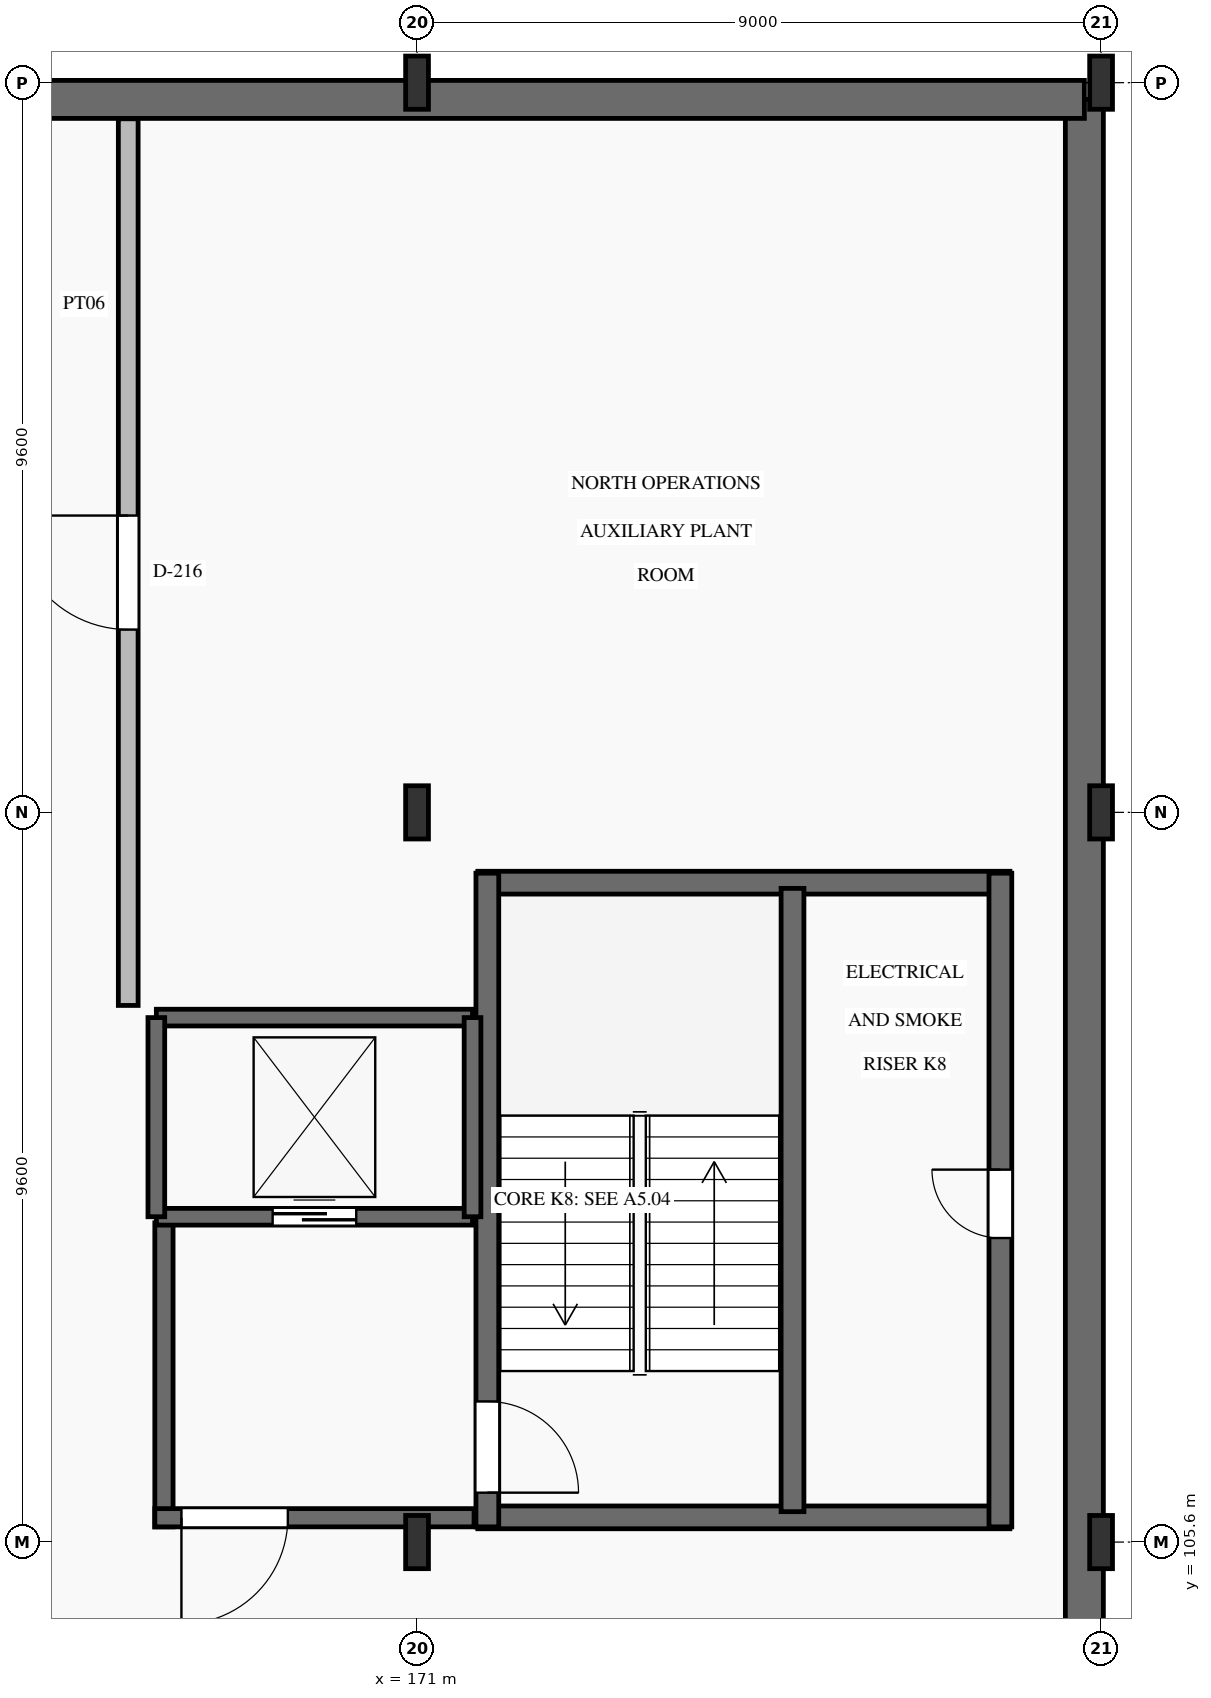
"""IFC4 building model, lengths in metres.
Left out: names, types, materials, properties, quantities, classifications, styles, units other than length and angle.
Written with IfcOpenShell. Run it as: python <this file> out.ifc"""

import sys

from ifc_helpers import new_model, si_unit, direction, frame, frame_2d, origin, origin_2d, place, context, subcontext, project, spatial, rectangle, i_section, extrude, element, fill, save


model = new_model("IFC4")
c1 = context("Model", 3, precision=1e-05, world=origin(), true_north=direction((0.0, 1.0)))
c2 = subcontext(c1, "Body", "Model", "MODEL_VIEW")
j1 = project(units=[si_unit("LENGTHUNIT", "METRE"), si_unit("PLANEANGLEUNIT", "RADIAN")], contexts=[c1])
p1 = place(None, origin())
s1 = spatial("IfcSite", under=j1, at=p1, CompositionType="ELEMENT")
p2 = place(p1, origin())
s2 = spatial("IfcBuilding", under=s1, at=p2, CompositionType="ELEMENT")
p3 = place(p2, frame((0.0, 0.0, -4.5)))
s3 = spatial("IfcBuildingStorey", under=s2, at=p3, CompositionType="ELEMENT", Elevation=-4.5)
for number, where, z_axis, x_axis in (
    (1, (171.0, 105.6, 0.0), (0.0, 0.0, 1.0), (1.0, 0.0, 0.0)),
    (2, (171.0, 115.2, 0.0), (0.0, 0.0, 1.0), (1.0, 0.0, 0.0)),
    (3, (171.0, 124.8, 0.0), (0.0, 0.0, 1.0), (1.0, 0.0, 0.0)),
    (4, (180.0, 105.6, 0.0), (0.0, 0.0, 1.0), (1.0, 0.0, 0.0)),
    (5, (180.0, 115.2, 0.0), (0.0, 0.0, 1.0), (1.0, 0.0, 0.0)),
    (6, (180.0, 124.8, 0.0), (0.0, 0.0, 1.0), (1.0, 0.0, 0.0)),
):
    element("IfcColumn", number, at=place(p3, frame(where, z_axis=z_axis, x_axis=x_axis)), inside=s3, PredefinedType="COLUMN", context=c2, shape_type="SweptSolid", body=[
        extrude(i_section(OverallWidth=0.3, OverallDepth=0.7, WebThickness=0.017, FlangeThickness=0.032, FilletRadius=0.027, at=origin_2d()), origin(), (0.0, 0.0, 1.0), 4.5),
    ])
p4 = place(p3, frame((179.78, 86.62, 0.0), z_axis=(0.0, 0.0, 1.0), x_axis=(0.0, 1.0, 0.0)))
e7 = element("IfcWall", 7, at=p4, inside=s3, PredefinedType="SHEAR", context=c2, shape_type="SweptSolid", body=[
    extrude(rectangle(XDim=37.96, YDim=0.5, at=frame_2d((18.98, 0.0))), origin(), (0.0, 0.0, 1.0), 4.2),
])
p5 = place(p3, frame((179.78, 124.58, 0.0), z_axis=(0.0, 0.0, 1.0), x_axis=(-1.0, 0.0, 0.0)))
e8 = element("IfcWall", 8, at=p5, inside=s3, PredefinedType="SHEAR", context=c2, shape_type="SweptSolid", body=[
    extrude(rectangle(XDim=62.4, YDim=0.5, at=frame_2d((31.2, 0.0))), origin(), (0.0, 0.0, 1.0), 4.2),
])
for number, where, z_axis, x_axis in (
    (9, (171.8, 105.925, 0.0), (0.0, 0.0, 1.0), (1.0, 0.0, 0.0)),
    (10, (171.8, 114.275, 0.0), (0.0, 0.0, 1.0), (1.0, 0.0, 0.0)),
):
    element("IfcWall", number, at=place(p3, frame(where, z_axis=z_axis, x_axis=x_axis)), inside=s3, PredefinedType="SHEAR", context=c2, shape_type="SweptSolid", body=[
        extrude(rectangle(XDim=7.0, YDim=0.3, at=frame_2d((3.5, 0.0))), origin(), (0.0, 0.0, 1.0), 4.5),
    ])
p6 = place(p3, frame((171.925, 105.8, 0.0), z_axis=(0.0, 0.0, 1.0), x_axis=(0.0, 1.0, 0.0)))
e11 = element("IfcWall", 11, at=p6, inside=s3, PredefinedType="SHEAR", context=c2, shape_type="SweptSolid", body=[
    extrude(rectangle(XDim=8.6, YDim=0.3, at=frame_2d((4.3, 0.0))), origin(), (0.0, 0.0, 1.0), 4.5),
])
p7 = place(p6, frame((0.45, 0.0, 0.0)))
e12 = element("IfcOpeningElement", 12, at=p7, cuts=e11, PredefinedType="OPENING", context=c2, shape_type="SweptSolid", body=[
    extrude(rectangle(XDim=1.2, YDim=2.15, at=frame_2d((0.6, 1.075))), frame((0.0, 0.165, 0.0), z_axis=(0.0, -1.0, 0.0), x_axis=(1.0, 0.0, 0.0)), (0.0, 0.0, 1.0), 0.33),
])
p8 = place(p3, frame((178.675, 105.8, 0.0), z_axis=(0.0, 0.0, 1.0), x_axis=(0.0, 1.0, 0.0)))
e13 = element("IfcWall", 13, at=p8, inside=s3, PredefinedType="SHEAR", context=c2, shape_type="SweptSolid", body=[
    extrude(rectangle(XDim=8.6, YDim=0.3, at=frame_2d((4.3, 0.0))), origin(), (0.0, 0.0, 1.0), 4.5),
])
p9 = place(p8, frame((3.8, 0.0, 0.0)))
e14 = element("IfcOpeningElement", 14, at=p9, cuts=e13, PredefinedType="OPENING", context=c2, shape_type="SweptSolid", body=[
    extrude(rectangle(XDim=0.9, YDim=2.05, at=frame_2d((0.45, 1.025))), frame((0.0, 0.165, 0.0), z_axis=(0.0, -1.0, 0.0), x_axis=(1.0, 0.0, 0.0)), (0.0, 0.0, 1.0), 0.33),
])
p10 = place(p3, frame((175.94, 106.0, 0.0), z_axis=(0.0, 0.0, 1.0), x_axis=(0.0, 1.0, 0.0)))
e15 = element("IfcWall", 15, at=p10, inside=s3, PredefinedType="SHEAR", context=c2, shape_type="SweptSolid", body=[
    extrude(rectangle(XDim=8.2, YDim=0.3, at=frame_2d((4.1, 0.0))), origin(), (0.0, 0.0, 1.0), 4.5),
])
p11 = place(p3, frame((167.67, 105.8, 0.0), z_axis=(0.0, 0.0, 1.0), x_axis=(0.0, 1.0, 0.0)))
e16 = element("IfcWall", 16, at=p11, inside=s3, PredefinedType="SHEAR", context=c2, shape_type="SweptSolid", body=[
    extrude(rectangle(XDim=4.0, YDim=0.24, at=frame_2d((2.0, 0.0))), origin(), (0.0, 0.0, 1.0), 4.5),
])
p12 = place(p3, frame((167.55, 105.92, 0.0), z_axis=(0.0, 0.0, 1.0), x_axis=(1.0, 0.0, 0.0)))
e17 = element("IfcWall", 17, at=p12, inside=s3, PredefinedType="SHEAR", context=c2, shape_type="SweptSolid", body=[
    extrude(rectangle(XDim=4.2, YDim=0.24, at=frame_2d((2.1, 0.0))), origin(), (0.0, 0.0, 1.0), 4.5),
])
p13 = place(p12, frame((0.35, 0.0, 0.0)))
e18 = element("IfcOpeningElement", 18, at=p13, cuts=e17, PredefinedType="OPENING", context=c2, shape_type="SweptSolid", body=[
    extrude(rectangle(XDim=1.4, YDim=2.2, at=frame_2d((0.7, 1.1))), frame((0.0, 0.135, 0.0), z_axis=(0.0, -1.0, 0.0), x_axis=(1.0, 0.0, 0.0)), (0.0, 0.0, 1.0), 0.27),
])
p14 = place(p3, frame((167.57, 109.88, 0.0), z_axis=(0.0, 0.0, 1.0), x_axis=(1.0, 0.0, 0.0)))
e19 = element("IfcWall", 19, at=p14, inside=s3, PredefinedType="SHEAR", context=c2, shape_type="SweptSolid", body=[
    extrude(rectangle(XDim=4.16, YDim=0.22, at=frame_2d((2.08, 0.0))), origin(), (0.0, 0.0, 1.0), 4.5),
])
p15 = place(p14, frame((1.53, 0.0, 0.0)))
e20 = element("IfcOpeningElement", 20, at=p15, cuts=e19, PredefinedType="OPENING", context=c2, shape_type="SweptSolid", body=[
    extrude(rectangle(XDim=1.1, YDim=2.15, at=frame_2d((0.55, 1.075))), frame((0.0, 0.125, 0.0), z_axis=(0.0, -1.0, 0.0), x_axis=(1.0, 0.0, 0.0)), (0.0, 0.0, 1.0), 0.25),
])
p16 = place(p3, frame((167.57, 112.5, 0.0), z_axis=(0.0, 0.0, 1.0), x_axis=(1.0, 0.0, 0.0)))
e21 = element("IfcWall", 21, at=p16, inside=s3, PredefinedType="SHEAR", context=c2, shape_type="SweptSolid", body=[
    extrude(rectangle(XDim=4.16, YDim=0.22, at=frame_2d((2.08, 0.0))), origin(), (0.0, 0.0, 1.0), 4.5),
])
for number, where, z_axis, x_axis in (
    (22, (167.57, 109.88, 0.0), (0.0, 0.0, 1.0), (0.0, 1.0, 0.0)),
    (23, (171.73, 109.88, 0.0), (0.0, 0.0, 1.0), (0.0, 1.0, 0.0)),
):
    element("IfcWall", number, at=place(p3, frame(where, z_axis=z_axis, x_axis=x_axis)), inside=s3, PredefinedType="SHEAR", context=c2, shape_type="SweptSolid", body=[
        extrude(rectangle(XDim=2.62, YDim=0.22, at=frame_2d((1.31, 0.0))), origin(), (0.0, 0.0, 1.0), 4.5),
    ])
p17 = place(p3, frame((167.2, 112.66, 0.0), z_axis=(0.0, 0.0, 1.0), x_axis=(0.0, 1.0, 0.0)))
e24 = element("IfcWall", 24, at=p17, inside=s3, PredefinedType="PARTITIONING", context=c2, shape_type="SweptSolid", body=[
    extrude(rectangle(XDim=11.665, YDim=0.26, at=frame_2d((5.833, 0.0))), origin(), (0.0, 0.0, 1.0), 4.2),
])
p18 = place(p17, frame((4.945, 0.0, 0.0)))
e25 = element("IfcOpeningElement", 25, at=p18, cuts=e24, PredefinedType="OPENING", context=c2, shape_type="SweptSolid", body=[
    extrude(rectangle(XDim=1.5, YDim=2.25, at=frame_2d((0.75, 1.125))), frame((0.0, 0.145, 0.0), z_axis=(0.0, -1.0, 0.0), x_axis=(1.0, 0.0, 0.0)), (0.0, 0.0, 1.0), 0.29),
])
p19 = place(p7, frame((1.2, 0.0, 0.0), z_axis=(0.0, 0.0, 1.0), x_axis=(-1.0, 0.0, 0.0)))
e26 = element("IfcDoor", 26, at=p19, inside=s3, OperationType="SINGLE_SWING_LEFT", PredefinedType="DOOR", context=c2, shape_type="SweptSolid", body=[
    extrude(rectangle(XDim=1.2, YDim=2.15, at=frame_2d((0.6, 1.075))), frame((0.0, 0.025, 0.0), z_axis=(0.0, -1.0, 0.0), x_axis=(1.0, 0.0, 0.0)), (0.0, 0.0, 1.0), 0.05),
])
fill(e12, e26)
p20 = place(p9, origin())
e27 = element("IfcDoor", 27, at=p20, inside=s3, OperationType="SINGLE_SWING_RIGHT", PredefinedType="DOOR", context=c2, shape_type="SweptSolid", body=[
    extrude(rectangle(XDim=0.9, YDim=2.05, at=frame_2d((0.45, 1.025))), frame((0.0, 0.025, 0.0), z_axis=(0.0, -1.0, 0.0), x_axis=(1.0, 0.0, 0.0)), (0.0, 0.0, 1.0), 0.05),
])
fill(e14, e27)
p21 = place(p13, frame((1.4, 0.0, 0.0), z_axis=(0.0, 0.0, 1.0), x_axis=(-1.0, 0.0, 0.0)))
e28 = element("IfcDoor", 28, at=p21, inside=s3, OperationType="SINGLE_SWING_LEFT", PredefinedType="DOOR", context=c2, shape_type="SweptSolid", body=[
    extrude(rectangle(XDim=1.4, YDim=2.2, at=frame_2d((0.7, 1.1))), frame((0.0, 0.025, 0.0), z_axis=(0.0, -1.0, 0.0), x_axis=(1.0, 0.0, 0.0)), (0.0, 0.0, 1.0), 0.05),
])
fill(e18, e28)
p22 = place(p15, origin())
e29 = element("IfcDoor", 29, at=p22, inside=s3, OperationType="SLIDING_TO_RIGHT", PredefinedType="DOOR", context=c2, shape_type="SweptSolid", body=[
    extrude(rectangle(XDim=1.1, YDim=2.15, at=frame_2d((0.55, 1.075))), frame((0.0, 0.025, 0.0), z_axis=(0.0, -1.0, 0.0), x_axis=(1.0, 0.0, 0.0)), (0.0, 0.0, 1.0), 0.05),
])
fill(e20, e29)
p23 = place(p18, origin())
e30 = element("IfcDoor", 30, at=p23, inside=s3, OperationType="SINGLE_SWING_RIGHT", PredefinedType="DOOR", context=c2, shape_type="SweptSolid", body=[
    extrude(rectangle(XDim=1.5, YDim=2.25, at=frame_2d((0.75, 1.125))), frame((0.0, 0.025, 0.0), z_axis=(0.0, -1.0, 0.0), x_axis=(1.0, 0.0, 0.0)), (0.0, 0.0, 1.0), 0.05),
])
fill(e25, e30)
save(model, sys.argv[1])
